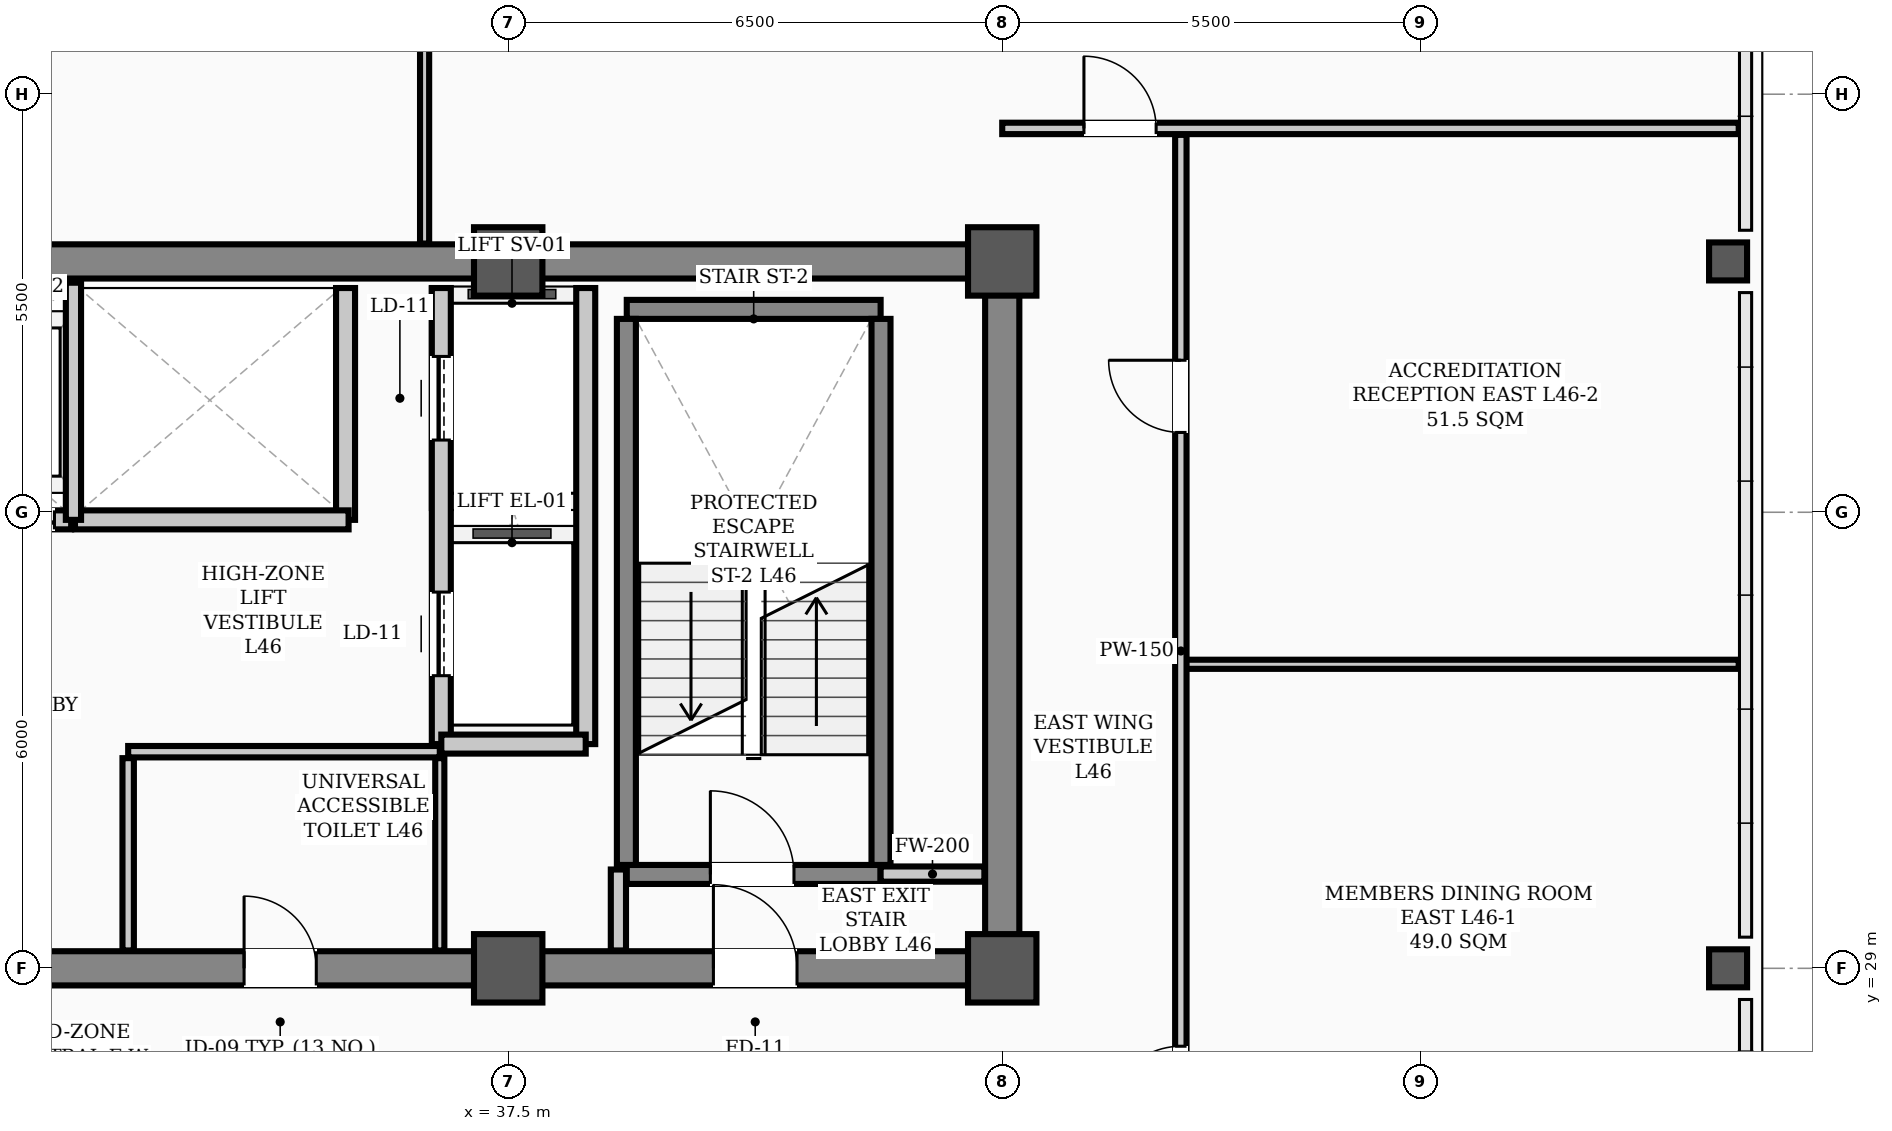
"""IFC4 building model, lengths in metres.
Left out: names, types, materials, properties, quantities, classifications, styles, units other than length and angle.
Written with IfcOpenShell. Run it as: python <this file> out.ifc"""

import sys

from ifc_helpers import new_model, si_unit, direction, frame, frame_2d, origin, origin_2d, place, context, subcontext, project, spatial, rectangle, hollow_rectangle, extrude, element, fill, save


model = new_model("IFC4")
c1 = context("Model", 3, precision=1e-05, world=origin(), true_north=direction((0.0, 1.0)))
c2 = subcontext(c1, "Body", "Model", "MODEL_VIEW")
j1 = project(units=[si_unit("LENGTHUNIT", "METRE"), si_unit("PLANEANGLEUNIT", "RADIAN")], contexts=[c1])
p1 = place(None, origin())
s1 = spatial("IfcSite", under=j1, at=p1, CompositionType="ELEMENT")
p2 = place(p1, origin())
s2 = spatial("IfcBuilding", under=s1, at=p2, CompositionType="ELEMENT")
p3 = place(p2, frame((0.0, 0.0, 185.1)))
s3 = spatial("IfcBuildingStorey", under=s2, at=p3, CompositionType="ELEMENT", Elevation=185.1)
for number, where, z_axis, x_axis in (
    (1, (37.5, 29.0, 0.0), (0.0, 0.0, 1.0), (1.0, 0.0, 0.0)),
    (2, (37.5, 38.3, 0.0), (0.0, 0.0, 1.0), (1.0, 0.0, 0.0)),
    (3, (44.0, 29.0, 0.0), (0.0, 0.0, 1.0), (1.0, 0.0, 0.0)),
    (4, (44.0, 38.3, 0.0), (0.0, 0.0, 1.0), (1.0, 0.0, 0.0)),
):
    element("IfcColumn", number, at=place(p3, frame(where, z_axis=z_axis, x_axis=x_axis)), inside=s3, PredefinedType="COLUMN", context=c2, shape_type="SweptSolid", body=[
        extrude(hollow_rectangle(XDim=0.9, YDim=0.9, WallThickness=0.035, InnerFilletRadius=0.017, OuterFilletRadius=0.052, at=origin_2d()), origin(), (0.0, 0.0, 1.0), 3.9),
    ])
for number, where, z_axis, x_axis in (
    (5, (53.55, 29.0, 0.0), (0.0, 0.0, 1.0), (1.0, 0.0, 0.0)),
    (6, (53.55, 38.3, 0.0), (0.0, 0.0, 1.0), (1.0, 0.0, 0.0)),
):
    element("IfcColumn", number, at=place(p3, frame(where, z_axis=z_axis, x_axis=x_axis)), inside=s3, PredefinedType="COLUMN", context=c2, shape_type="SweptSolid", body=[
        extrude(hollow_rectangle(XDim=0.5, YDim=0.5, WallThickness=0.024, InnerFilletRadius=0.012, OuterFilletRadius=0.036, at=origin_2d()), origin(), (0.0, 0.0, 1.0), 3.9),
    ])
p4 = place(p3, frame((13.5, 29.0, 0.0), z_axis=(0.0, 0.0, 1.0), x_axis=(1.0, 0.0, 0.0)))
e7 = element("IfcWall", 7, at=p4, inside=s3, PredefinedType="SHEAR", context=c2, shape_type="SweptSolid", body=[
    extrude(rectangle(XDim=30.5, YDim=0.45, at=frame_2d((15.25, 0.0))), origin(), (0.0, 0.0, 1.0), 3.72),
])
p5 = place(p4, frame((1.75, 0.0, 0.0)))
e8 = element("IfcOpeningElement", 8, at=p5, cuts=e7, PredefinedType="OPENING", context=c2, shape_type="SweptSolid", body=[
    extrude(rectangle(XDim=1.1, YDim=2.08, at=frame_2d((0.55, 1.04))), frame((0.0, 0.235, 0.0), z_axis=(0.0, -1.0, 0.0), x_axis=(1.0, 0.0, 0.0)), (0.0, 0.0, 1.0), 0.47),
])
p6 = place(p4, frame((26.7, 0.0, 0.0)))
e9 = element("IfcOpeningElement", 9, at=p6, cuts=e7, PredefinedType="OPENING", context=c2, shape_type="SweptSolid", body=[
    extrude(rectangle(XDim=1.1, YDim=2.08, at=frame_2d((0.55, 1.04))), frame((0.0, 0.235, 0.0), z_axis=(0.0, -1.0, 0.0), x_axis=(1.0, 0.0, 0.0)), (0.0, 0.0, 1.0), 0.47),
])
p7 = place(p4, frame((6.8, 0.0, 0.0)))
e10 = element("IfcOpeningElement", 10, at=p7, cuts=e7, PredefinedType="OPENING", context=c2, shape_type="SweptSolid", body=[
    extrude(rectangle(XDim=1.1, YDim=2.08, at=frame_2d((0.55, 1.04))), frame((0.0, 0.235, 0.0), z_axis=(0.0, -1.0, 0.0), x_axis=(1.0, 0.0, 0.0)), (0.0, 0.0, 1.0), 0.47),
])
p8 = place(p4, frame((13.2, 0.0, 0.0)))
e11 = element("IfcOpeningElement", 11, at=p8, cuts=e7, PredefinedType="OPENING", context=c2, shape_type="SweptSolid", body=[
    extrude(rectangle(XDim=1.6, YDim=2.08, at=frame_2d((0.8, 1.04))), frame((0.0, 0.235, 0.0), z_axis=(0.0, -1.0, 0.0), x_axis=(1.0, 0.0, 0.0)), (0.0, 0.0, 1.0), 0.47),
])
p9 = place(p4, frame((20.525, 0.0, 0.0)))
e12 = element("IfcOpeningElement", 12, at=p9, cuts=e7, PredefinedType="OPENING", context=c2, shape_type="SweptSolid", body=[
    extrude(rectangle(XDim=0.95, YDim=2.08, at=frame_2d((0.475, 1.04))), frame((0.0, 0.235, 0.0), z_axis=(0.0, -1.0, 0.0), x_axis=(1.0, 0.0, 0.0)), (0.0, 0.0, 1.0), 0.47),
])
p10 = place(p3, frame((13.5, 38.3, 0.0), z_axis=(0.0, 0.0, 1.0), x_axis=(1.0, 0.0, 0.0)))
e13 = element("IfcWall", 13, at=p10, inside=s3, PredefinedType="SHEAR", context=c2, shape_type="SweptSolid", body=[
    extrude(rectangle(XDim=30.5, YDim=0.45, at=frame_2d((15.25, 0.0))), origin(), (0.0, 0.0, 1.0), 3.72),
])
p11 = place(p3, frame((44.0, 29.35, 0.0), z_axis=(0.0, 0.0, 1.0), x_axis=(0.0, 1.0, 0.0)))
e14 = element("IfcWall", 14, at=p11, inside=s3, PredefinedType="SHEAR", context=c2, shape_type="SweptSolid", body=[
    extrude(rectangle(XDim=8.6, YDim=0.45, at=frame_2d((4.3, 0.0))), origin(), (0.0, 0.0, 1.0), 3.72),
])
p12 = place(p3, frame((39.06, 30.235, 0.0), z_axis=(0.0, 0.0, 1.0), x_axis=(1.0, 0.0, 0.0)))
e15 = element("IfcWall", 15, at=p12, inside=s3, PredefinedType="STANDARD", context=c2, shape_type="SweptSolid", body=[
    extrude(rectangle(XDim=3.34, YDim=0.25, at=frame_2d((1.67, 0.0))), origin(), (0.0, 0.0, 1.0), 3.72),
])
p13 = place(p12, frame((1.1, 0.0, 0.0)))
e16 = element("IfcOpeningElement", 16, at=p13, cuts=e15, PredefinedType="OPENING", context=c2, shape_type="SweptSolid", body=[
    extrude(rectangle(XDim=1.1, YDim=2.08, at=frame_2d((0.55, 1.04))), frame((0.0, 0.135, 0.0), z_axis=(0.0, -1.0, 0.0), x_axis=(1.0, 0.0, 0.0)), (0.0, 0.0, 1.0), 0.27),
])
p14 = place(p3, frame((39.06, 37.669, 0.0), z_axis=(0.0, 0.0, 1.0), x_axis=(1.0, 0.0, 0.0)))
e17 = element("IfcWall", 17, at=p14, inside=s3, PredefinedType="STANDARD", context=c2, shape_type="SweptSolid", body=[
    extrude(rectangle(XDim=3.34, YDim=0.25, at=frame_2d((1.67, 0.0))), origin(), (0.0, 0.0, 1.0), 3.72),
])
for number, where, z_axis, x_axis in (
    (18, (39.055, 30.36, 0.0), (0.0, 0.0, 1.0), (0.0, 1.0, 0.0)),
    (19, (42.405, 30.36, 0.0), (0.0, 0.0, 1.0), (0.0, 1.0, 0.0)),
):
    element("IfcWall", number, at=place(p3, frame(where, z_axis=z_axis, x_axis=x_axis)), inside=s3, PredefinedType="STANDARD", context=c2, shape_type="SweptSolid", body=[
        extrude(rectangle(XDim=7.184, YDim=0.25, at=frame_2d((3.592, 0.0))), origin(), (0.0, 0.0, 1.0), 3.72),
    ])
p15 = place(p3, frame((36.62, 31.95, 0.0), z_axis=(0.0, 0.0, 1.0), x_axis=(0.0, 1.0, 0.0)))
e20 = element("IfcWall", 20, at=p15, inside=s3, PredefinedType="STANDARD", context=c2, shape_type="SweptSolid", body=[
    extrude(rectangle(XDim=6.0, YDim=0.25, at=frame_2d((3.0, 0.0))), origin(), (0.0, 0.0, 1.0), 3.35),
])
p16 = place(p15, frame((0.9, 0.0, 0.0)))
e21 = element("IfcOpeningElement", 21, at=p16, cuts=e20, PredefinedType="OPENING", context=c2, shape_type="SweptSolid", body=[
    extrude(rectangle(XDim=1.1, YDim=2.08, at=frame_2d((0.55, 1.04))), frame((0.0, 0.135, 0.0), z_axis=(0.0, -1.0, 0.0), x_axis=(1.0, 0.0, 0.0)), (0.0, 0.0, 1.0), 0.27),
])
p17 = place(p15, frame((4.0, 0.0, 0.0)))
e22 = element("IfcOpeningElement", 22, at=p17, cuts=e20, PredefinedType="OPENING", context=c2, shape_type="SweptSolid", body=[
    extrude(rectangle(XDim=1.1, YDim=2.08, at=frame_2d((0.55, 1.04))), frame((0.0, 0.135, 0.0), z_axis=(0.0, -1.0, 0.0), x_axis=(1.0, 0.0, 0.0)), (0.0, 0.0, 1.0), 0.27),
])
p18 = place(p3, frame((38.52, 31.95, 0.0), z_axis=(0.0, 0.0, 1.0), x_axis=(0.0, 1.0, 0.0)))
e23 = element("IfcWall", 23, at=p18, inside=s3, PredefinedType="STANDARD", context=c2, shape_type="SweptSolid", body=[
    extrude(rectangle(XDim=6.0, YDim=0.25, at=frame_2d((3.0, 0.0))), origin(), (0.0, 0.0, 1.0), 3.35),
])
p19 = place(p3, frame((36.62, 31.95, 0.0), z_axis=(0.0, 0.0, 1.0), x_axis=(1.0, 0.0, 0.0)))
e24 = element("IfcWall", 24, at=p19, inside=s3, PredefinedType="STANDARD", context=c2, shape_type="SweptSolid", body=[
    extrude(rectangle(XDim=1.9, YDim=0.25, at=frame_2d((0.95, 0.0))), origin(), (0.0, 0.0, 1.0), 3.48),
])
p20 = place(p3, frame((35.36, 34.9, 0.0), z_axis=(0.0, 0.0, 1.0), x_axis=(0.0, 1.0, 0.0)))
e25 = element("IfcWall", 25, at=p20, inside=s3, PredefinedType="STANDARD", context=c2, shape_type="SweptSolid", body=[
    extrude(rectangle(XDim=3.05, YDim=0.25, at=frame_2d((1.525, 0.0))), origin(), (0.0, 0.0, 1.0), 3.35),
])
p21 = place(p3, frame((28.2, 34.9, 0.0), z_axis=(0.0, 0.0, 1.0), x_axis=(1.0, 0.0, 0.0)))
e26 = element("IfcWall", 26, at=p21, inside=s3, PredefinedType="STANDARD", context=c2, shape_type="SweptSolid", body=[
    extrude(rectangle(XDim=3.55, YDim=0.25, at=frame_2d((1.775, 0.0))), origin(), (0.0, 0.0, 1.0), 3.72),
])
p22 = place(p21, frame((0.23, 0.0, 0.0)))
e27 = element("IfcOpeningElement", 27, at=p22, cuts=e26, PredefinedType="OPENING", context=c2, shape_type="SweptSolid", body=[
    extrude(rectangle(XDim=1.3, YDim=2.08, at=frame_2d((0.65, 1.04))), frame((0.0, 0.135, 0.0), z_axis=(0.0, -1.0, 0.0), x_axis=(1.0, 0.0, 0.0)), (0.0, 0.0, 1.0), 0.27),
])
p23 = place(p21, frame((2.03, 0.0, 0.0)))
e28 = element("IfcOpeningElement", 28, at=p23, cuts=e26, PredefinedType="OPENING", context=c2, shape_type="SweptSolid", body=[
    extrude(rectangle(XDim=1.3, YDim=2.08, at=frame_2d((0.65, 1.04))), frame((0.0, 0.135, 0.0), z_axis=(0.0, -1.0, 0.0), x_axis=(1.0, 0.0, 0.0)), (0.0, 0.0, 1.0), 0.27),
])
p24 = place(p3, frame((31.8, 34.9, 0.0), z_axis=(0.0, 0.0, 1.0), x_axis=(1.0, 0.0, 0.0)))
e29 = element("IfcWall", 29, at=p24, inside=s3, PredefinedType="STANDARD", context=c2, shape_type="SweptSolid", body=[
    extrude(rectangle(XDim=3.6, YDim=0.25, at=frame_2d((1.8, 0.0))), origin(), (0.0, 0.0, 1.0), 3.72),
])
p25 = place(p3, frame((42.4, 30.24, 0.0), z_axis=(0.0, 0.0, 1.0), x_axis=(1.0, 0.0, 0.0)))
e30 = element("IfcWall", 30, at=p25, inside=s3, PredefinedType="STANDARD", context=c2, shape_type="SweptSolid", body=[
    extrude(rectangle(XDim=1.365, YDim=0.2, at=frame_2d((0.683, 0.0))), origin(), (0.0, 0.0, 1.0), 3.2),
])
p26 = place(p3, frame((32.5, 31.85, 0.0), z_axis=(0.0, 0.0, 1.0), x_axis=(1.0, 0.0, 0.0)))
e31 = element("IfcWall", 31, at=p26, inside=s3, PredefinedType="PARTITIONING", context=c2, shape_type="SweptSolid", body=[
    extrude(rectangle(XDim=4.1, YDim=0.15, at=frame_2d((2.05, 0.0))), origin(), (0.0, 0.0, 1.0), 3.72),
])
p27 = place(p3, frame((46.35, 33.0, 0.0), z_axis=(0.0, 0.0, 1.0), x_axis=(1.0, 0.0, 0.0)))
e32 = element("IfcWall", 32, at=p27, inside=s3, PredefinedType="PARTITIONING", context=c2, shape_type="SweptSolid", body=[
    extrude(rectangle(XDim=7.34, YDim=0.12, at=frame_2d((3.67, 0.0))), origin(), (0.0, 0.0, 1.0), 3.212),
])
p28 = place(p3, frame((44.0, 40.05, 0.0), z_axis=(0.0, 0.0, 1.0), x_axis=(1.0, 0.0, 0.0)))
e33 = element("IfcWall", 33, at=p28, inside=s3, PredefinedType="PARTITIONING", context=c2, shape_type="SweptSolid", body=[
    extrude(rectangle(XDim=9.69, YDim=0.15, at=frame_2d((4.845, 0.0))), origin(), (0.0, 0.0, 1.0), 3.2),
])
p29 = place(p28, frame((1.075, 0.0, 0.0)))
e34 = element("IfcOpeningElement", 34, at=p29, cuts=e33, PredefinedType="OPENING", context=c2, shape_type="SweptSolid", body=[
    extrude(rectangle(XDim=0.95, YDim=2.08, at=frame_2d((0.475, 1.04))), frame((0.0, 0.085, 0.0), z_axis=(0.0, -1.0, 0.0), x_axis=(1.0, 0.0, 0.0)), (0.0, 0.0, 1.0), 0.17),
])
p30 = place(p3, frame((38.95, 29.235, 0.0), z_axis=(0.0, 0.0, 1.0), x_axis=(0.0, 1.0, 0.0)))
e35 = element("IfcWall", 35, at=p30, inside=s3, PredefinedType="STANDARD", context=c2, shape_type="SweptSolid", body=[
    extrude(rectangle(XDim=1.065, YDim=0.2, at=frame_2d((0.532, 0.0))), origin(), (0.0, 0.0, 1.0), 3.35),
])
p31 = place(p3, frame((32.5, 29.235, 0.0), z_axis=(0.0, 0.0, 1.0), x_axis=(0.0, 1.0, 0.0)))
e36 = element("IfcWall", 36, at=p31, inside=s3, PredefinedType="PARTITIONING", context=c2, shape_type="SweptSolid", body=[
    extrude(rectangle(XDim=2.53, YDim=0.15, at=frame_2d((1.265, 0.0))), origin(), (0.0, 0.0, 1.0), 3.35),
])
p32 = place(p3, frame((36.6, 29.235, 0.0), z_axis=(0.0, 0.0, 1.0), x_axis=(0.0, 1.0, 0.0)))
e37 = element("IfcWall", 37, at=p32, inside=s3, PredefinedType="PARTITIONING", context=c2, shape_type="SweptSolid", body=[
    extrude(rectangle(XDim=2.53, YDim=0.12, at=frame_2d((1.265, 0.0))), origin(), (0.0, 0.0, 1.0), 3.35),
])
p33 = place(p3, frame((46.35, 26.385, 0.0), z_axis=(0.0, 0.0, 1.0), x_axis=(0.0, 1.0, 0.0)))
e38 = element("IfcWall", 38, at=p33, inside=s3, PredefinedType="PARTITIONING", context=c2, shape_type="SweptSolid", body=[
    extrude(rectangle(XDim=13.58, YDim=0.15, at=frame_2d((6.79, 0.0))), origin(), (0.0, 0.0, 1.0), 3.1),
])
p34 = place(p33, frame((0.64, 0.0, 0.0)))
e39 = element("IfcOpeningElement", 39, at=p34, cuts=e38, PredefinedType="OPENING", context=c2, shape_type="SweptSolid", body=[
    extrude(rectangle(XDim=0.95, YDim=2.08, at=frame_2d((0.475, 1.04))), frame((0.0, 0.085, 0.0), z_axis=(0.0, -1.0, 0.0), x_axis=(1.0, 0.0, 0.0)), (0.0, 0.0, 1.0), 0.17),
])
p35 = place(p33, frame((9.665, 0.0, 0.0)))
e40 = element("IfcOpeningElement", 40, at=p35, cuts=e38, PredefinedType="OPENING", context=c2, shape_type="SweptSolid", body=[
    extrude(rectangle(XDim=0.95, YDim=2.08, at=frame_2d((0.475, 1.04))), frame((0.0, 0.085, 0.0), z_axis=(0.0, -1.0, 0.0), x_axis=(1.0, 0.0, 0.0)), (0.0, 0.0, 1.0), 0.17),
])
p36 = place(p3, frame((36.4, 38.535, 0.0), z_axis=(0.0, 0.0, 1.0), x_axis=(0.0, 1.0, 0.0)))
e41 = element("IfcWall", 41, at=p36, inside=s3, PredefinedType="PARTITIONING", context=c2, shape_type="SweptSolid", body=[
    extrude(rectangle(XDim=6.405, YDim=0.12, at=frame_2d((3.203, 0.0))), origin(), (0.0, 0.0, 1.0), 3.212),
])
p37 = place(p36, frame((3.485, 0.0, 0.0)))
e42 = element("IfcOpeningElement", 42, at=p37, cuts=e41, PredefinedType="OPENING", context=c2, shape_type="SweptSolid", body=[
    extrude(rectangle(XDim=0.95, YDim=2.08, at=frame_2d((0.475, 1.04))), frame((0.0, 0.07, 0.0), z_axis=(0.0, -1.0, 0.0), x_axis=(1.0, 0.0, 0.0)), (0.0, 0.0, 1.0), 0.14),
])
p38 = place(p3, frame((31.78, 34.9, 0.0), z_axis=(0.0, 0.0, 1.0), x_axis=(0.0, 1.0, 0.0)))
e43 = element("IfcWall", 43, at=p38, inside=s3, PredefinedType="STANDARD", context=c2, shape_type="SweptSolid", body=[
    extrude(rectangle(XDim=3.12, YDim=0.2, at=frame_2d((1.56, 0.0))), origin(), (0.0, 0.0, 1.0), 3.35),
])
p39 = place(p13, origin())
e44 = element("IfcDoor", 44, at=p39, inside=s3, OperationType="SINGLE_SWING_LEFT", PredefinedType="DOOR", context=c2, shape_type="SweptSolid", body=[
    extrude(rectangle(XDim=1.1, YDim=2.08, at=frame_2d((0.55, 1.04))), frame((0.0, 0.025, 0.0), z_axis=(0.0, -1.0, 0.0), x_axis=(1.0, 0.0, 0.0)), (0.0, 0.0, 1.0), 0.05),
])
fill(e16, e44)
p40 = place(p6, origin())
e45 = element("IfcDoor", 45, at=p40, inside=s3, OperationType="SINGLE_SWING_LEFT", PredefinedType="DOOR", context=c2, shape_type="SweptSolid", body=[
    extrude(rectangle(XDim=1.1, YDim=2.08, at=frame_2d((0.55, 1.04))), frame((0.0, 0.025, 0.0), z_axis=(0.0, -1.0, 0.0), x_axis=(1.0, 0.0, 0.0)), (0.0, 0.0, 1.0), 0.05),
])
fill(e9, e45)
p41 = place(p9, origin())
e46 = element("IfcDoor", 46, at=p41, inside=s3, OperationType="SINGLE_SWING_LEFT", PredefinedType="DOOR", context=c2, shape_type="SweptSolid", body=[
    extrude(rectangle(XDim=0.95, YDim=2.08, at=frame_2d((0.475, 1.04))), frame((0.0, 0.025, 0.0), z_axis=(0.0, -1.0, 0.0), x_axis=(1.0, 0.0, 0.0)), (0.0, 0.0, 1.0), 0.05),
])
fill(e12, e46)
p42 = place(p34, origin())
e47 = element("IfcDoor", 47, at=p42, inside=s3, OperationType="SINGLE_SWING_LEFT", PredefinedType="DOOR", context=c2, shape_type="SweptSolid", body=[
    extrude(rectangle(XDim=0.95, YDim=2.08, at=frame_2d((0.475, 1.04))), frame((0.0, 0.025, 0.0), z_axis=(0.0, -1.0, 0.0), x_axis=(1.0, 0.0, 0.0)), (0.0, 0.0, 1.0), 0.05),
])
fill(e39, e47)
p43 = place(p35, origin())
e48 = element("IfcDoor", 48, at=p43, inside=s3, OperationType="SINGLE_SWING_RIGHT", PredefinedType="DOOR", context=c2, shape_type="SweptSolid", body=[
    extrude(rectangle(XDim=0.95, YDim=2.08, at=frame_2d((0.475, 1.04))), frame((0.0, 0.025, 0.0), z_axis=(0.0, -1.0, 0.0), x_axis=(1.0, 0.0, 0.0)), (0.0, 0.0, 1.0), 0.05),
])
fill(e40, e48)
p44 = place(p29, origin())
e49 = element("IfcDoor", 49, at=p44, inside=s3, OperationType="SINGLE_SWING_LEFT", PredefinedType="DOOR", context=c2, shape_type="SweptSolid", body=[
    extrude(rectangle(XDim=0.95, YDim=2.08, at=frame_2d((0.475, 1.04))), frame((0.0, 0.025, 0.0), z_axis=(0.0, -1.0, 0.0), x_axis=(1.0, 0.0, 0.0)), (0.0, 0.0, 1.0), 0.05),
])
fill(e34, e49)
p45 = place(p16, origin())
e50 = element("IfcDoor", 50, at=p45, inside=s3, OperationType="SLIDING_TO_LEFT", PredefinedType="DOOR", context=c2, shape_type="SweptSolid", body=[
    extrude(rectangle(XDim=1.1, YDim=2.08, at=frame_2d((0.55, 1.04))), frame((0.0, 0.025, 0.0), z_axis=(0.0, -1.0, 0.0), x_axis=(1.0, 0.0, 0.0)), (0.0, 0.0, 1.0), 0.05),
])
fill(e21, e50)
p46 = place(p17, origin())
e51 = element("IfcDoor", 51, at=p46, inside=s3, OperationType="SLIDING_TO_LEFT", PredefinedType="DOOR", context=c2, shape_type="SweptSolid", body=[
    extrude(rectangle(XDim=1.1, YDim=2.08, at=frame_2d((0.55, 1.04))), frame((0.0, 0.025, 0.0), z_axis=(0.0, -1.0, 0.0), x_axis=(1.0, 0.0, 0.0)), (0.0, 0.0, 1.0), 0.05),
])
fill(e22, e51)
p47 = place(p23, origin())
e52 = element("IfcDoor", 52, at=p47, inside=s3, OperationType="DOUBLE_DOOR_SLIDING", PredefinedType="DOOR", context=c2, shape_type="SweptSolid", body=[
    extrude(rectangle(XDim=1.3, YDim=2.08, at=frame_2d((0.65, 1.04))), frame((0.0, 0.025, 0.0), z_axis=(0.0, -1.0, 0.0), x_axis=(1.0, 0.0, 0.0)), (0.0, 0.0, 1.0), 0.05),
])
fill(e28, e52)
save(model, sys.argv[1])
